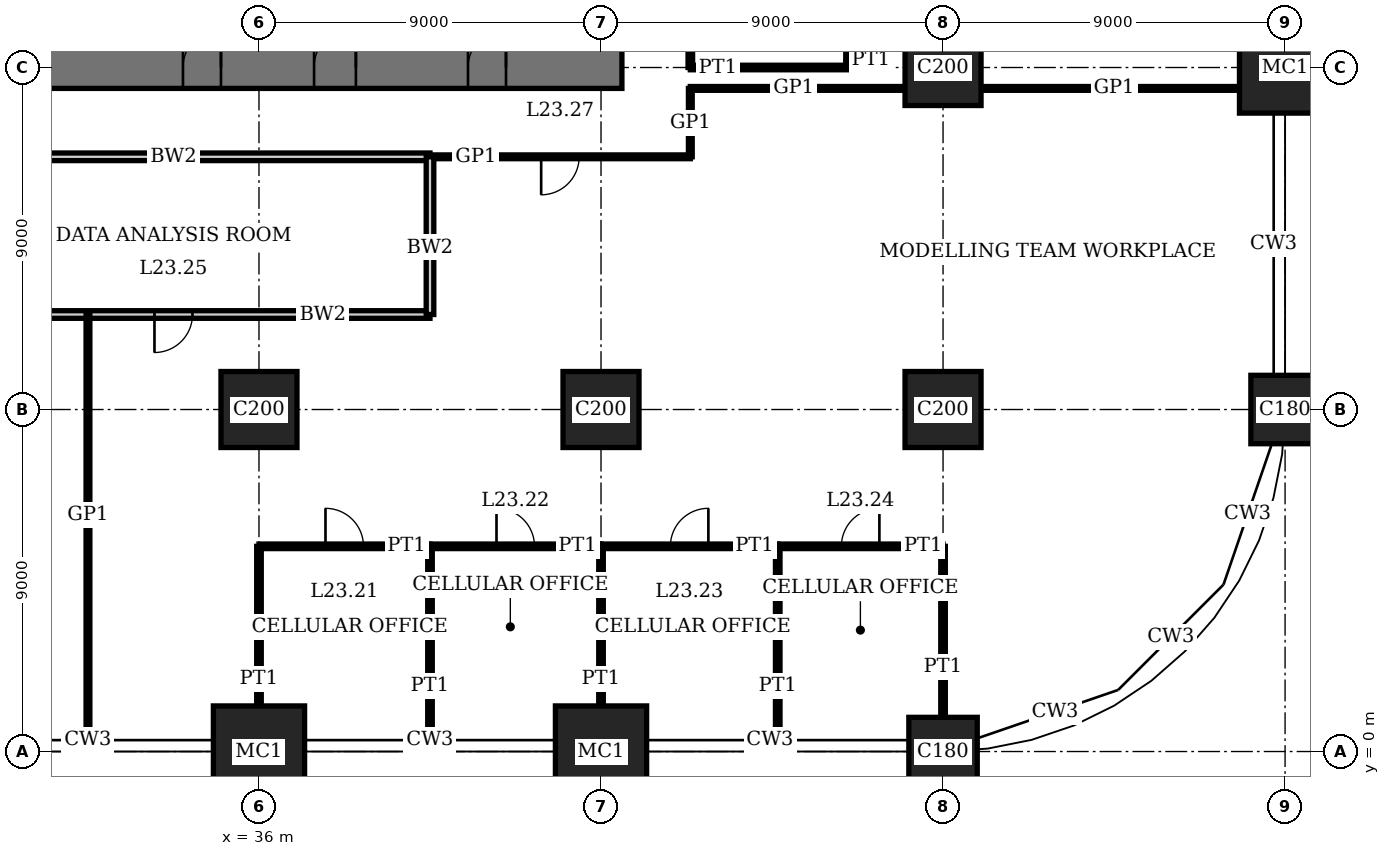
"""IFC4 building model, lengths in metres.
Left out: names, types, materials, properties, quantities, classifications, styles, units other than length and angle.
Written with IfcOpenShell. Run it as: python <this file> out.ifc"""

import sys

from ifc_helpers import new_model, si_unit, direction, frame, frame_2d, origin, origin_2d, place, context, subcontext, project, spatial, rectangle, extrude, element, fill, save


model = new_model("IFC4")
c1 = context("Model", 3, precision=1e-05, world=origin(), true_north=direction((0.0, 1.0)))
c2 = subcontext(c1, "Body", "Model", "MODEL_VIEW")
j1 = project(units=[si_unit("LENGTHUNIT", "METRE"), si_unit("PLANEANGLEUNIT", "RADIAN")], contexts=[c1])
p1 = place(None, origin())
s1 = spatial("IfcSite", under=j1, at=p1, CompositionType="ELEMENT")
p2 = place(p1, origin())
s2 = spatial("IfcBuilding", under=s1, at=p2, CompositionType="ELEMENT")
p3 = place(p2, frame((0.0, 0.0, 97.0)))
s3 = spatial("IfcBuildingStorey", under=s2, at=p3, CompositionType="ELEMENT", Elevation=97.0)
p4 = place(p3, frame((36.0, 0.0, 0.0), z_axis=(0.0, 0.0, 1.0), x_axis=(1.0, 0.0, 0.0)))
e1 = element("IfcColumn", 1, at=p4, inside=s3, PredefinedType="COLUMN", context=c2, shape_type="SweptSolid", body=[
    extrude(rectangle(XDim=2.4, YDim=2.4, at=origin_2d()), origin(), (0.0, 0.0, 1.0), 4.0),
])
p5 = place(p3, frame((36.0, 9.0, 0.0), z_axis=(0.0, 0.0, 1.0), x_axis=(1.0, 0.0, 0.0)))
e2 = element("IfcColumn", 2, at=p5, inside=s3, PredefinedType="COLUMN", context=c2, shape_type="SweptSolid", body=[
    extrude(rectangle(XDim=2.0, YDim=2.0, at=origin_2d()), origin(), (0.0, 0.0, 1.0), 4.0),
])
p6 = place(p3, frame((45.0, 0.0, 0.0), z_axis=(0.0, 0.0, 1.0), x_axis=(1.0, 0.0, 0.0)))
e3 = element("IfcColumn", 3, at=p6, inside=s3, PredefinedType="COLUMN", context=c2, shape_type="SweptSolid", body=[
    extrude(rectangle(XDim=2.4, YDim=2.4, at=origin_2d()), origin(), (0.0, 0.0, 1.0), 4.0),
])
p7 = place(p3, frame((45.0, 9.0, 0.0), z_axis=(0.0, 0.0, 1.0), x_axis=(1.0, 0.0, 0.0)))
e4 = element("IfcColumn", 4, at=p7, inside=s3, PredefinedType="COLUMN", context=c2, shape_type="SweptSolid", body=[
    extrude(rectangle(XDim=2.0, YDim=2.0, at=origin_2d()), origin(), (0.0, 0.0, 1.0), 4.0),
])
p8 = place(p3, frame((54.0, 0.0, 0.0), z_axis=(0.0, 0.0, 1.0), x_axis=(1.0, 0.0, 0.0)))
e5 = element("IfcColumn", 5, at=p8, inside=s3, PredefinedType="COLUMN", context=c2, shape_type="SweptSolid", body=[
    extrude(rectangle(XDim=1.8, YDim=1.8, at=origin_2d()), origin(), (0.0, 0.0, 1.0), 4.0),
])
for number, where, z_axis, x_axis in (
    (6, (54.0, 9.0, 0.0), (0.0, 0.0, 1.0), (1.0, 0.0, 0.0)),
    (7, (54.0, 18.0, 0.0), (0.0, 0.0, 1.0), (1.0, 0.0, 0.0)),
):
    element("IfcColumn", number, at=place(p3, frame(where, z_axis=z_axis, x_axis=x_axis)), inside=s3, PredefinedType="COLUMN", context=c2, shape_type="SweptSolid", body=[
        extrude(rectangle(XDim=2.0, YDim=2.0, at=origin_2d()), origin(), (0.0, 0.0, 1.0), 4.0),
    ])
p9 = place(p3, frame((63.0, 9.0, 0.0), z_axis=(0.0, 0.0, 1.0), x_axis=(1.0, 0.0, 0.0)))
e8 = element("IfcColumn", 8, at=p9, inside=s3, PredefinedType="COLUMN", context=c2, shape_type="SweptSolid", body=[
    extrude(rectangle(XDim=1.8, YDim=1.8, at=origin_2d()), origin(), (0.0, 0.0, 1.0), 4.0),
])
p10 = place(p3, frame((63.0, 18.0, 0.0), z_axis=(0.0, 0.0, 1.0), x_axis=(1.0, 0.0, 0.0)))
e9 = element("IfcColumn", 9, at=p10, inside=s3, PredefinedType="COLUMN", context=c2, shape_type="SweptSolid", body=[
    extrude(rectangle(XDim=2.4, YDim=2.4, at=origin_2d()), origin(), (0.0, 0.0, 1.0), 4.0),
])
p11 = place(p3, frame((17.45, 18.0, 0.0), z_axis=(0.0, 0.0, 1.0), x_axis=(1.0, 0.0, 0.0)))
e10 = element("IfcWall", 10, at=p11, inside=s3, PredefinedType="SHEAR", context=c2, shape_type="SweptSolid", body=[
    extrude(rectangle(XDim=28.1, YDim=1.1, at=frame_2d((14.05, 0.0))), origin(), (0.0, 0.0, 1.0), 4.0),
])
p12 = place(p11, frame((11.55, 0.0, 0.0)))
e11 = element("IfcOpeningElement", 11, at=p12, cuts=e10, PredefinedType="OPENING", context=c2, shape_type="SweptSolid", body=[
    extrude(rectangle(XDim=1.0, YDim=2.4, at=frame_2d((0.5, 1.2))), frame((0.0, 0.56, 0.0), z_axis=(0.0, -1.0, 0.0), x_axis=(1.0, 0.0, 0.0)), (0.0, 0.0, 1.0), 1.12),
])
p13 = place(p11, frame((16.55, 0.0, 0.0)))
e12 = element("IfcOpeningElement", 12, at=p13, cuts=e10, PredefinedType="OPENING", context=c2, shape_type="SweptSolid", body=[
    extrude(rectangle(XDim=1.0, YDim=2.4, at=frame_2d((0.5, 1.2))), frame((0.0, 0.56, 0.0), z_axis=(0.0, -1.0, 0.0), x_axis=(1.0, 0.0, 0.0)), (0.0, 0.0, 1.0), 1.12),
])
p14 = place(p11, frame((20.0, 0.0, 0.0)))
e13 = element("IfcOpeningElement", 13, at=p14, cuts=e10, PredefinedType="OPENING", context=c2, shape_type="SweptSolid", body=[
    extrude(rectangle(XDim=1.1, YDim=2.4, at=frame_2d((0.55, 1.2))), frame((0.0, 0.56, 0.0), z_axis=(0.0, -1.0, 0.0), x_axis=(1.0, 0.0, 0.0)), (0.0, 0.0, 1.0), 1.12),
])
p15 = place(p11, frame((24.05, 0.0, 0.0)))
e14 = element("IfcOpeningElement", 14, at=p15, cuts=e10, PredefinedType="OPENING", context=c2, shape_type="SweptSolid", body=[
    extrude(rectangle(XDim=1.0, YDim=2.4, at=frame_2d((0.5, 1.2))), frame((0.0, 0.56, 0.0), z_axis=(0.0, -1.0, 0.0), x_axis=(1.0, 0.0, 0.0)), (0.0, 0.0, 1.0), 1.12),
])
p16 = place(p3, frame((36.0, 5.4, 0.0), z_axis=(0.0, 0.0, 1.0), x_axis=(1.0, 0.0, 0.0)))
e15 = element("IfcWall", 15, at=p16, inside=s3, PredefinedType="PARTITIONING", context=c2, shape_type="SweptSolid", body=[
    extrude(rectangle(XDim=4.5, YDim=0.12, at=frame_2d((2.25, 0.0))), origin(), (0.0, 0.0, 1.0), 3.75),
])
p17 = place(p16, frame((1.75, 0.0, 0.0)))
e16 = element("IfcOpeningElement", 16, at=p17, cuts=e15, PredefinedType="OPENING", context=c2, shape_type="SweptSolid", body=[
    extrude(rectangle(XDim=1.0, YDim=2.4, at=frame_2d((0.5, 1.2))), frame((0.0, 0.07, 0.0), z_axis=(0.0, -1.0, 0.0), x_axis=(1.0, 0.0, 0.0)), (0.0, 0.0, 1.0), 0.14),
])
p18 = place(p3, frame((40.5, 5.4, 0.0), z_axis=(0.0, 0.0, 1.0), x_axis=(1.0, 0.0, 0.0)))
e17 = element("IfcWall", 17, at=p18, inside=s3, PredefinedType="PARTITIONING", context=c2, shape_type="SweptSolid", body=[
    extrude(rectangle(XDim=4.5, YDim=0.12, at=frame_2d((2.25, 0.0))), origin(), (0.0, 0.0, 1.0), 3.75),
])
p19 = place(p18, frame((1.75, 0.0, 0.0)))
e18 = element("IfcOpeningElement", 18, at=p19, cuts=e17, PredefinedType="OPENING", context=c2, shape_type="SweptSolid", body=[
    extrude(rectangle(XDim=1.0, YDim=2.4, at=frame_2d((0.5, 1.2))), frame((0.0, 0.07, 0.0), z_axis=(0.0, -1.0, 0.0), x_axis=(1.0, 0.0, 0.0)), (0.0, 0.0, 1.0), 0.14),
])
p20 = place(p3, frame((45.0, 5.4, 0.0), z_axis=(0.0, 0.0, 1.0), x_axis=(1.0, 0.0, 0.0)))
e19 = element("IfcWall", 19, at=p20, inside=s3, PredefinedType="PARTITIONING", context=c2, shape_type="SweptSolid", body=[
    extrude(rectangle(XDim=4.65, YDim=0.12, at=frame_2d((2.325, 0.0))), origin(), (0.0, 0.0, 1.0), 3.75),
])
p21 = place(p20, frame((1.825, 0.0, 0.0)))
e20 = element("IfcOpeningElement", 20, at=p21, cuts=e19, PredefinedType="OPENING", context=c2, shape_type="SweptSolid", body=[
    extrude(rectangle(XDim=1.0, YDim=2.4, at=frame_2d((0.5, 1.2))), frame((0.0, 0.07, 0.0), z_axis=(0.0, -1.0, 0.0), x_axis=(1.0, 0.0, 0.0)), (0.0, 0.0, 1.0), 0.14),
])
p22 = place(p3, frame((49.65, 5.4, 0.0), z_axis=(0.0, 0.0, 1.0), x_axis=(1.0, 0.0, 0.0)))
e21 = element("IfcWall", 21, at=p22, inside=s3, PredefinedType="PARTITIONING", context=c2, shape_type="SweptSolid", body=[
    extrude(rectangle(XDim=4.35, YDim=0.12, at=frame_2d((2.175, 0.0))), origin(), (0.0, 0.0, 1.0), 3.75),
])
p23 = place(p22, frame((1.675, 0.0, 0.0)))
e22 = element("IfcOpeningElement", 22, at=p23, cuts=e21, PredefinedType="OPENING", context=c2, shape_type="SweptSolid", body=[
    extrude(rectangle(XDim=1.0, YDim=2.4, at=frame_2d((0.5, 1.2))), frame((0.0, 0.07, 0.0), z_axis=(0.0, -1.0, 0.0), x_axis=(1.0, 0.0, 0.0)), (0.0, 0.0, 1.0), 0.14),
])
p24 = place(p3, frame((27.0, 11.5, 0.0), z_axis=(0.0, 0.0, 1.0), x_axis=(1.0, 0.0, 0.0)))
e23 = element("IfcWall", 23, at=p24, inside=s3, PredefinedType="SOLIDWALL", context=c2, shape_type="SweptSolid", body=[
    extrude(rectangle(XDim=13.5, YDim=0.2, at=frame_2d((6.75, 0.0))), origin(), (0.0, 0.0, 1.0), 3.75),
])
p25 = place(p24, frame((6.25, 0.0, 0.0)))
e24 = element("IfcOpeningElement", 24, at=p25, cuts=e23, PredefinedType="OPENING", context=c2, shape_type="SweptSolid", body=[
    extrude(rectangle(XDim=1.0, YDim=2.4, at=frame_2d((0.5, 1.2))), frame((0.0, 0.11, 0.0), z_axis=(0.0, -1.0, 0.0), x_axis=(1.0, 0.0, 0.0)), (0.0, 0.0, 1.0), 0.22),
])
p26 = place(p3, frame((27.0, 15.65, 0.0), z_axis=(0.0, 0.0, 1.0), x_axis=(1.0, 0.0, 0.0)))
e25 = element("IfcWall", 25, at=p26, inside=s3, PredefinedType="SOLIDWALL", context=c2, shape_type="SweptSolid", body=[
    extrude(rectangle(XDim=13.5, YDim=0.2, at=frame_2d((6.75, 0.0))), origin(), (0.0, 0.0, 1.0), 3.75),
])
p27 = place(p3, frame((40.5, 15.65, 0.0), z_axis=(0.0, 0.0, 1.0), x_axis=(1.0, 0.0, 0.0)))
e26 = element("IfcWall", 26, at=p27, inside=s3, PredefinedType="PARTITIONING", context=c2, shape_type="SweptSolid", body=[
    extrude(rectangle(XDim=6.85, YDim=0.1, at=frame_2d((3.425, 0.0))), origin(), (0.0, 0.0, 1.0), 3.75),
])
p28 = place(p27, frame((2.925, 0.0, 0.0)))
e27 = element("IfcOpeningElement", 27, at=p28, cuts=e26, PredefinedType="OPENING", context=c2, shape_type="SweptSolid", body=[
    extrude(rectangle(XDim=1.0, YDim=2.4, at=frame_2d((0.5, 1.2))), frame((0.0, 0.06, 0.0), z_axis=(0.0, -1.0, 0.0), x_axis=(1.0, 0.0, 0.0)), (0.0, 0.0, 1.0), 0.12),
])
p29 = place(p3, frame((47.35, 17.45, 0.0), z_axis=(0.0, 0.0, 1.0), x_axis=(1.0, 0.0, 0.0)))
e28 = element("IfcWall", 28, at=p29, inside=s3, PredefinedType="PARTITIONING", context=c2, shape_type="SweptSolid", body=[
    extrude(rectangle(XDim=5.65, YDim=0.1, at=frame_2d((2.825, 0.0))), origin(), (0.0, 0.0, 1.0), 3.75),
])
p30 = place(p3, frame((55.0, 17.45, 0.0), z_axis=(0.0, 0.0, 1.0), x_axis=(1.0, 0.0, 0.0)))
e29 = element("IfcWall", 29, at=p30, inside=s3, PredefinedType="PARTITIONING", context=c2, shape_type="SweptSolid", body=[
    extrude(rectangle(XDim=6.8, YDim=0.1, at=frame_2d((3.4, 0.0))), origin(), (0.0, 0.0, 1.0), 3.75),
])
p31 = place(p3, frame((47.35, 18.0, 0.0), z_axis=(0.0, 0.0, 1.0), x_axis=(1.0, 0.0, 0.0)))
e30 = element("IfcWall", 30, at=p31, inside=s3, PredefinedType="PARTITIONING", context=c2, shape_type="SweptSolid", body=[
    extrude(rectangle(XDim=4.15, YDim=0.12, at=frame_2d((2.075, 0.0))), origin(), (0.0, 0.0, 1.0), 3.05),
])
p32 = place(p3, frame((31.5, 0.31, 0.0), z_axis=(0.0, 0.0, 1.0), x_axis=(0.0, 1.0, 0.0)))
e31 = element("IfcWall", 31, at=p32, inside=s3, PredefinedType="PARTITIONING", context=c2, shape_type="SweptSolid", body=[
    extrude(rectangle(XDim=11.2, YDim=0.1, at=frame_2d((5.6, 0.0))), origin(), (0.0, 0.0, 1.0), 3.75),
])
p33 = place(p3, frame((36.0, 1.2, 0.0), z_axis=(0.0, 0.0, 1.0), x_axis=(0.0, 1.0, 0.0)))
e32 = element("IfcWall", 32, at=p33, inside=s3, PredefinedType="PARTITIONING", context=c2, shape_type="SweptSolid", body=[
    extrude(rectangle(XDim=4.2, YDim=0.12, at=frame_2d((2.1, 0.0))), origin(), (0.0, 0.0, 1.0), 3.05),
])
p34 = place(p3, frame((40.5, 11.5, 0.0), z_axis=(0.0, 0.0, 1.0), x_axis=(0.0, 1.0, 0.0)))
e33 = element("IfcWall", 33, at=p34, inside=s3, PredefinedType="SOLIDWALL", context=c2, shape_type="SweptSolid", body=[
    extrude(rectangle(XDim=4.15, YDim=0.2, at=frame_2d((2.075, 0.0))), origin(), (0.0, 0.0, 1.0), 3.75),
])
p35 = place(p3, frame((40.5, 0.31, 0.0), z_axis=(0.0, 0.0, 1.0), x_axis=(0.0, 1.0, 0.0)))
e34 = element("IfcWall", 34, at=p35, inside=s3, PredefinedType="PARTITIONING", context=c2, shape_type="SweptSolid", body=[
    extrude(rectangle(XDim=5.09, YDim=0.12, at=frame_2d((2.545, 0.0))), origin(), (0.0, 0.0, 1.0), 3.75),
])
p36 = place(p3, frame((45.0, 1.2, 0.0), z_axis=(0.0, 0.0, 1.0), x_axis=(0.0, 1.0, 0.0)))
e35 = element("IfcWall", 35, at=p36, inside=s3, PredefinedType="PARTITIONING", context=c2, shape_type="SweptSolid", body=[
    extrude(rectangle(XDim=4.2, YDim=0.12, at=frame_2d((2.1, 0.0))), origin(), (0.0, 0.0, 1.0), 3.05),
])
p37 = place(p3, frame((47.35, 18.0, 0.0), z_axis=(0.0, 0.0, 1.0), x_axis=(0.0, 1.0, 0.0)))
e36 = element("IfcWall", 36, at=p37, inside=s3, PredefinedType="PARTITIONING", context=c2, shape_type="SweptSolid", body=[
    extrude(rectangle(XDim=4.5, YDim=0.12, at=frame_2d((2.25, 0.0))), origin(), (0.0, 0.0, 1.0), 3.75),
])
p38 = place(p3, frame((47.35, 15.65, 0.0), z_axis=(0.0, 0.0, 1.0), x_axis=(0.0, 1.0, 0.0)))
e37 = element("IfcWall", 37, at=p38, inside=s3, PredefinedType="PARTITIONING", context=c2, shape_type="SweptSolid", body=[
    extrude(rectangle(XDim=1.8, YDim=0.1, at=frame_2d((0.9, 0.0))), origin(), (0.0, 0.0, 1.0), 3.75),
])
p39 = place(p3, frame((49.65, 0.31, 0.0), z_axis=(0.0, 0.0, 1.0), x_axis=(0.0, 1.0, 0.0)))
e38 = element("IfcWall", 38, at=p39, inside=s3, PredefinedType="PARTITIONING", context=c2, shape_type="SweptSolid", body=[
    extrude(rectangle(XDim=5.09, YDim=0.12, at=frame_2d((2.545, 0.0))), origin(), (0.0, 0.0, 1.0), 3.75),
])
p40 = place(p3, frame((51.5, 18.0, 0.0), z_axis=(0.0, 0.0, 1.0), x_axis=(0.0, 1.0, 0.0)))
e39 = element("IfcWall", 39, at=p40, inside=s3, PredefinedType="PARTITIONING", context=c2, shape_type="SweptSolid", body=[
    extrude(rectangle(XDim=4.5, YDim=0.12, at=frame_2d((2.25, 0.0))), origin(), (0.0, 0.0, 1.0), 3.75),
])
p41 = place(p40, frame((1.75, 0.0, 0.0)))
e40 = element("IfcOpeningElement", 40, at=p41, cuts=e39, PredefinedType="OPENING", context=c2, shape_type="SweptSolid", body=[
    extrude(rectangle(XDim=1.0, YDim=2.4, at=frame_2d((0.5, 1.2))), frame((0.0, 0.07, 0.0), z_axis=(0.0, -1.0, 0.0), x_axis=(1.0, 0.0, 0.0)), (0.0, 0.0, 1.0), 0.14),
])
p42 = place(p3, frame((54.0, 0.9, 0.0), z_axis=(0.0, 0.0, 1.0), x_axis=(0.0, 1.0, 0.0)))
e41 = element("IfcWall", 41, at=p42, inside=s3, PredefinedType="PARTITIONING", context=c2, shape_type="SweptSolid", body=[
    extrude(rectangle(XDim=4.5, YDim=0.12, at=frame_2d((2.25, 0.0))), origin(), (0.0, 0.0, 1.0), 3.05),
])
p43 = place(p13, origin())
e42 = element("IfcDoor", 42, at=p43, inside=s3, OperationType="SINGLE_SWING_LEFT", PredefinedType="DOOR", context=c2, shape_type="SweptSolid", body=[
    extrude(rectangle(XDim=1.0, YDim=2.4, at=frame_2d((0.5, 1.2))), frame((0.0, 0.025, 0.0), z_axis=(0.0, -1.0, 0.0), x_axis=(1.0, 0.0, 0.0)), (0.0, 0.0, 1.0), 0.05),
    extrude(rectangle(XDim=0.04, YDim=2.4, at=frame_2d((0.02, 1.2))), frame((0.0, 0.4, 0.0), z_axis=(0.0, -1.0, 0.0), x_axis=(1.0, 0.0, 0.0)), (0.0, 0.0, 1.0), 0.8),
    extrude(rectangle(XDim=0.04, YDim=2.4, at=frame_2d((0.98, 1.2))), frame((0.0, 0.4, 0.0), z_axis=(0.0, -1.0, 0.0), x_axis=(1.0, 0.0, 0.0)), (0.0, 0.0, 1.0), 0.8),
    extrude(rectangle(XDim=1.0, YDim=0.04, at=frame_2d((0.5, 2.38))), frame((0.0, 0.4, 0.0), z_axis=(0.0, -1.0, 0.0), x_axis=(1.0, 0.0, 0.0)), (0.0, 0.0, 1.0), 0.8),
])
fill(e12, e42)
p44 = place(p14, origin())
e43 = element("IfcDoor", 43, at=p44, inside=s3, OperationType="SINGLE_SWING_LEFT", PredefinedType="DOOR", context=c2, shape_type="SweptSolid", body=[
    extrude(rectangle(XDim=1.1, YDim=2.4, at=frame_2d((0.55, 1.2))), frame((0.0, 0.025, 0.0), z_axis=(0.0, -1.0, 0.0), x_axis=(1.0, 0.0, 0.0)), (0.0, 0.0, 1.0), 0.05),
    extrude(rectangle(XDim=0.04, YDim=2.4, at=frame_2d((0.02, 1.2))), frame((0.0, 0.44, 0.0), z_axis=(0.0, -1.0, 0.0), x_axis=(1.0, 0.0, 0.0)), (0.0, 0.0, 1.0), 0.88),
    extrude(rectangle(XDim=0.04, YDim=2.4, at=frame_2d((1.08, 1.2))), frame((0.0, 0.44, 0.0), z_axis=(0.0, -1.0, 0.0), x_axis=(1.0, 0.0, 0.0)), (0.0, 0.0, 1.0), 0.88),
    extrude(rectangle(XDim=1.1, YDim=0.04, at=frame_2d((0.55, 2.38))), frame((0.0, 0.44, 0.0), z_axis=(0.0, -1.0, 0.0), x_axis=(1.0, 0.0, 0.0)), (0.0, 0.0, 1.0), 0.88),
])
fill(e13, e43)
p45 = place(p15, origin())
e44 = element("IfcDoor", 44, at=p45, inside=s3, OperationType="SINGLE_SWING_LEFT", PredefinedType="DOOR", context=c2, shape_type="SweptSolid", body=[
    extrude(rectangle(XDim=1.0, YDim=2.4, at=frame_2d((0.5, 1.2))), frame((0.0, 0.025, 0.0), z_axis=(0.0, -1.0, 0.0), x_axis=(1.0, 0.0, 0.0)), (0.0, 0.0, 1.0), 0.05),
    extrude(rectangle(XDim=0.04, YDim=2.4, at=frame_2d((0.02, 1.2))), frame((0.0, 0.4, 0.0), z_axis=(0.0, -1.0, 0.0), x_axis=(1.0, 0.0, 0.0)), (0.0, 0.0, 1.0), 0.8),
    extrude(rectangle(XDim=0.04, YDim=2.4, at=frame_2d((0.98, 1.2))), frame((0.0, 0.4, 0.0), z_axis=(0.0, -1.0, 0.0), x_axis=(1.0, 0.0, 0.0)), (0.0, 0.0, 1.0), 0.8),
    extrude(rectangle(XDim=1.0, YDim=0.04, at=frame_2d((0.5, 2.38))), frame((0.0, 0.4, 0.0), z_axis=(0.0, -1.0, 0.0), x_axis=(1.0, 0.0, 0.0)), (0.0, 0.0, 1.0), 0.8),
])
fill(e14, e44)
p46 = place(p17, origin())
e45 = element("IfcDoor", 45, at=p46, inside=s3, OperationType="SINGLE_SWING_RIGHT", PredefinedType="DOOR", context=c2, shape_type="SweptSolid", body=[
    extrude(rectangle(XDim=1.0, YDim=2.4, at=frame_2d((0.5, 1.2))), frame((0.0, 0.025, 0.0), z_axis=(0.0, -1.0, 0.0), x_axis=(1.0, 0.0, 0.0)), (0.0, 0.0, 1.0), 0.05),
])
fill(e16, e45)
p47 = place(p19, origin())
e46 = element("IfcDoor", 46, at=p47, inside=s3, OperationType="SINGLE_SWING_RIGHT", PredefinedType="DOOR", context=c2, shape_type="SweptSolid", body=[
    extrude(rectangle(XDim=1.0, YDim=2.4, at=frame_2d((0.5, 1.2))), frame((0.0, 0.025, 0.0), z_axis=(0.0, -1.0, 0.0), x_axis=(1.0, 0.0, 0.0)), (0.0, 0.0, 1.0), 0.05),
])
fill(e18, e46)
p48 = place(p21, origin())
e47 = element("IfcDoor", 47, at=p48, inside=s3, OperationType="SINGLE_SWING_LEFT", PredefinedType="DOOR", context=c2, shape_type="SweptSolid", body=[
    extrude(rectangle(XDim=1.0, YDim=2.4, at=frame_2d((0.5, 1.2))), frame((0.0, 0.025, 0.0), z_axis=(0.0, -1.0, 0.0), x_axis=(1.0, 0.0, 0.0)), (0.0, 0.0, 1.0), 0.05),
])
fill(e20, e47)
p49 = place(p23, origin())
e48 = element("IfcDoor", 48, at=p49, inside=s3, OperationType="SINGLE_SWING_LEFT", PredefinedType="DOOR", context=c2, shape_type="SweptSolid", body=[
    extrude(rectangle(XDim=1.0, YDim=2.4, at=frame_2d((0.5, 1.2))), frame((0.0, 0.025, 0.0), z_axis=(0.0, -1.0, 0.0), x_axis=(1.0, 0.0, 0.0)), (0.0, 0.0, 1.0), 0.05),
])
fill(e22, e48)
p50 = place(p25, origin())
e49 = element("IfcDoor", 49, at=p50, inside=s3, OperationType="SINGLE_SWING_LEFT", PredefinedType="DOOR", context=c2, shape_type="SweptSolid", body=[
    extrude(rectangle(XDim=1.0, YDim=2.4, at=frame_2d((0.5, 1.2))), frame((0.0, 0.035, 0.0), z_axis=(0.0, -1.0, 0.0), x_axis=(1.0, 0.0, 0.0)), (0.0, 0.0, 1.0), 0.07),
])
fill(e24, e49)
p51 = place(p28, origin())
e50 = element("IfcDoor", 50, at=p51, inside=s3, OperationType="SINGLE_SWING_LEFT", PredefinedType="DOOR", context=c2, shape_type="SweptSolid", body=[
    extrude(rectangle(XDim=1.0, YDim=2.4, at=frame_2d((0.5, 1.2))), frame((0.0, 0.02, 0.0), z_axis=(0.0, -1.0, 0.0), x_axis=(1.0, 0.0, 0.0)), (0.0, 0.0, 1.0), 0.04),
])
fill(e27, e50)
save(model, sys.argv[1])
